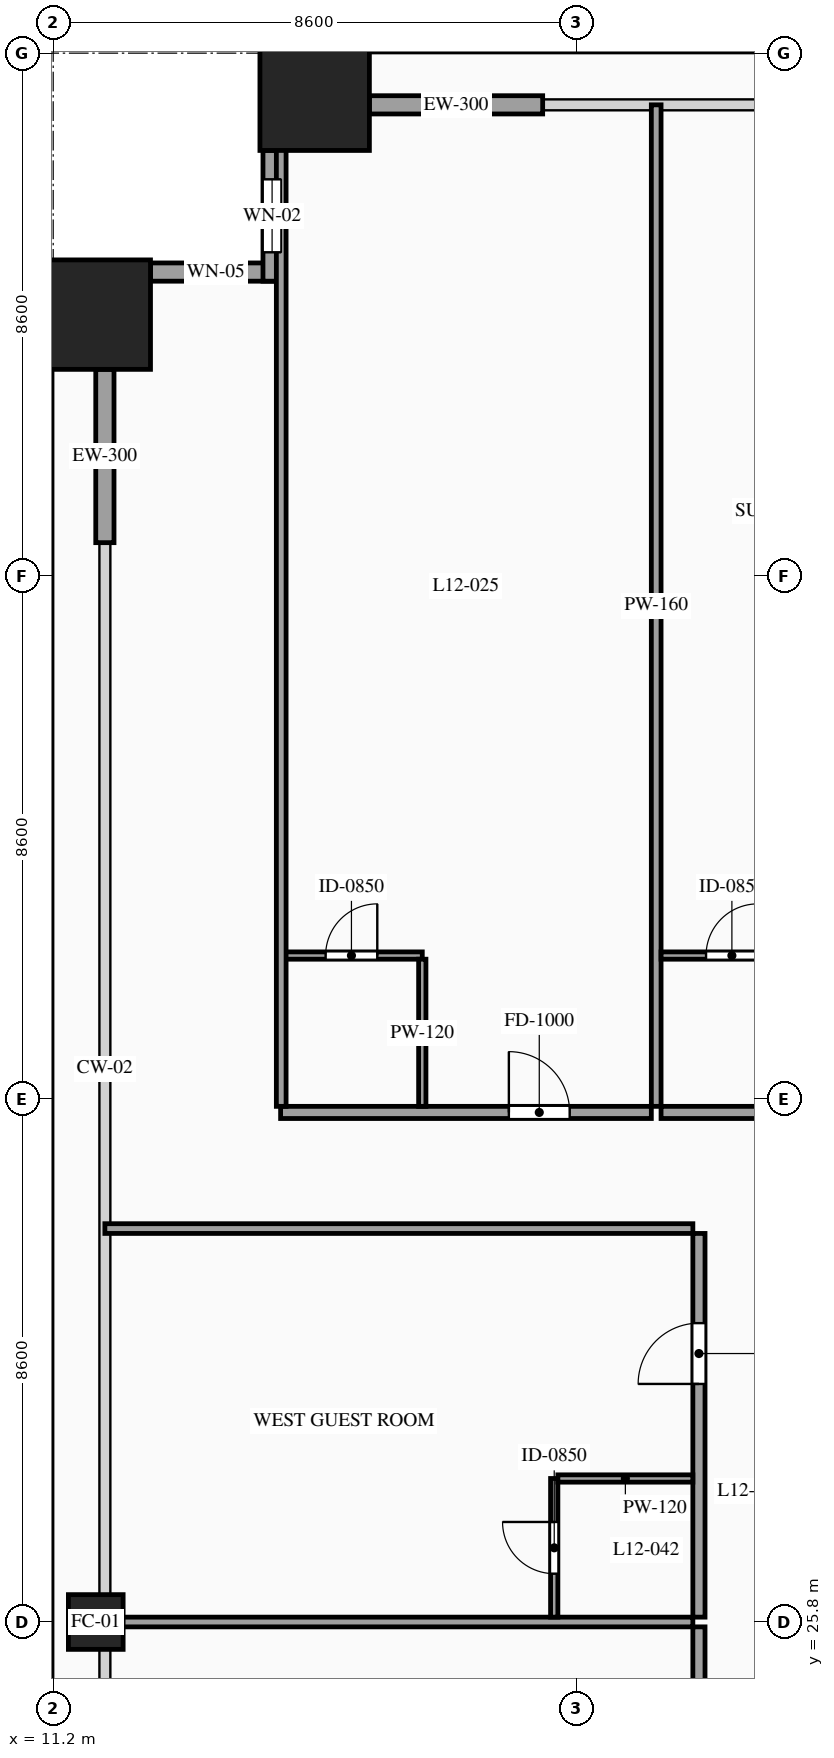
"""IFC4 building model, lengths in metres.
Left out: names, types, materials, properties, quantities, classifications, styles, units other than length and angle.
Written with IfcOpenShell. Run it as: python <this file> out.ifc"""

import sys

from ifc_helpers import new_model, si_unit, direction, frame, frame_2d, origin, origin_2d, place, context, subcontext, project, spatial, rectangle, hollow_rectangle, extrude, source, transform, mapped, element, fill, save


model = new_model("IFC4")
c1 = context("Model", 3, precision=1e-05, world=origin(), true_north=direction((0.0, 1.0)))
c2 = subcontext(c1, "Body", "Model", "MODEL_VIEW")
j1 = project(units=[si_unit("LENGTHUNIT", "METRE"), si_unit("PLANEANGLEUNIT", "RADIAN")], contexts=[c1])
p1 = place(None, origin())
s1 = spatial("IfcSite", under=j1, at=p1, CompositionType="ELEMENT")
p2 = place(p1, origin())
s2 = spatial("IfcBuilding", under=s1, at=p2, CompositionType="ELEMENT")
p3 = place(p2, frame((0.0, 0.0, 49.6)))
s3 = spatial("IfcBuildingStorey", under=s2, at=p3, CompositionType="ELEMENT", Elevation=49.6)
m1 = source(origin(), c2, "Body", "SweptSolid", [
    extrude(hollow_rectangle(XDim=1.8, YDim=1.8, WallThickness=0.08, at=origin_2d()), origin(), (0.0, 0.0, 1.0), 3.6),
])
p4 = place(p3, frame((15.5, 50.9, 0.0), z_axis=(0.0, 0.0, 1.0), x_axis=(1.0, 0.0, 0.0)))
e1 = element("IfcColumn", 1, at=p4, inside=s3, PredefinedType="COLUMN", context=c2, shape_type="MappedRepresentation", body=[
    mapped(m1, transform((0.0, 0.0, 0.0), scale=1.0)),
])
m2 = source(origin(), c2, "Body", "SweptSolid", [
    extrude(hollow_rectangle(XDim=0.9, YDim=0.9, WallThickness=0.042, at=origin_2d()), origin(), (0.0, 0.0, 1.0), 3.6),
])
p5 = place(p3, frame((11.9, 25.8, 0.0), z_axis=(0.0, 0.0, 1.0), x_axis=(1.0, 0.0, 0.0)))
e2 = element("IfcColumn", 2, at=p5, inside=s3, PredefinedType="COLUMN", context=c2, shape_type="MappedRepresentation", body=[
    mapped(m2, transform((0.0, 0.0, 0.0), scale=1.0)),
])
p6 = place(p3, frame((11.9, 47.3, 0.0), z_axis=(0.0, 0.0, 1.0), x_axis=(1.0, 0.0, 0.0)))
e3 = element("IfcColumn", 3, at=p6, inside=s3, PredefinedType="COLUMN", context=c2, shape_type="MappedRepresentation", body=[
    mapped(m1, transform((0.0, 0.0, 0.0), scale=1.0)),
])
p7 = place(p3, frame((14.95, 48.0, 0.0), z_axis=(0.0, 0.0, 1.0), x_axis=(-1.0, 0.0, 0.0)))
e4 = element("IfcWall", 4, at=p7, inside=s3, PredefinedType="SOLIDWALL", context=c2, shape_type="SweptSolid", body=[
    extrude(rectangle(XDim=2.15, YDim=0.3, at=frame_2d((1.075, 0.0))), origin(), (0.0, 0.0, 1.0), 3.38),
])
p8 = place(p7, frame((0.625, 0.0, 0.85)))
e5 = element("IfcOpeningElement", 5, at=p8, cuts=e4, PredefinedType="OPENING", context=c2, shape_type="SweptSolid", body=[
    extrude(rectangle(XDim=0.9, YDim=1.5, at=frame_2d((0.45, 0.75))), frame((0.0, 0.165, 0.0), z_axis=(0.0, -1.0, 0.0), x_axis=(1.0, 0.0, 0.0)), (0.0, 0.0, 1.0), 0.33),
])
p9 = place(p3, frame((14.8, 50.0, 0.0), z_axis=(0.0, 0.0, 1.0), x_axis=(0.0, -1.0, 0.0)))
e6 = element("IfcWall", 6, at=p9, inside=s3, PredefinedType="SOLIDWALL", context=c2, shape_type="SweptSolid", body=[
    extrude(rectangle(XDim=2.15, YDim=0.3, at=frame_2d((1.075, 0.0))), origin(), (0.0, 0.0, 1.0), 3.38),
])
p10 = place(p9, frame((0.475, 0.0, 0.85)))
e7 = element("IfcOpeningElement", 7, at=p10, cuts=e6, PredefinedType="OPENING", context=c2, shape_type="SweptSolid", body=[
    extrude(rectangle(XDim=1.2, YDim=2.1, at=frame_2d((0.6, 1.05))), frame((0.0, 0.165, 0.0), z_axis=(0.0, -1.0, 0.0), x_axis=(1.0, 0.0, 0.0)), (0.0, 0.0, 1.0), 0.33),
])
m3 = source(origin(), c2, "Body", "SweptSolid", [
    extrude(rectangle(XDim=2.85, YDim=0.3, at=frame_2d((1.425, 0.0))), origin(), (0.0, 0.0, 1.0), 2.775),
])
p11 = place(p3, frame((16.4, 50.75, 0.0), z_axis=(0.0, 0.0, 1.0), x_axis=(1.0, 0.0, 0.0)))
e8 = element("IfcWall", 8, at=p11, inside=s3, PredefinedType="SOLIDWALL", context=c2, shape_type="MappedRepresentation", body=[
    mapped(m3, transform((0.0, 0.0, 0.0), scale=1.0)),
])
m4 = source(origin(), c2, "Body", "SweptSolid", [
    extrude(rectangle(XDim=2.85, YDim=0.3, at=frame_2d((1.425, 0.0))), origin(), (0.0, 0.0, 1.0), 2.775),
])
p12 = place(p3, frame((12.05, 43.55, 0.0), z_axis=(0.0, 0.0, 1.0), x_axis=(0.0, 1.0, 0.0)))
e9 = element("IfcWall", 9, at=p12, inside=s3, PredefinedType="SOLIDWALL", context=c2, shape_type="MappedRepresentation", body=[
    mapped(m4, transform((0.0, 0.0, 0.0), scale=1.0)),
])
p13 = place(p3, frame((14.94, 34.18, 0.0), z_axis=(0.0, 0.0, 1.0), x_axis=(1.0, 0.0, 0.0)))
e10 = element("IfcWall", 10, at=p13, inside=s3, PredefinedType="PARTITIONING", context=c2, shape_type="SweptSolid", body=[
    extrude(rectangle(XDim=6.097, YDim=0.2, at=frame_2d((3.049, 0.0))), origin(), (0.0, 0.0, 1.0), 3.38),
])
p14 = place(p13, frame((3.754, 0.0, 0.0)))
e11 = element("IfcOpeningElement", 11, at=p14, cuts=e10, PredefinedType="OPENING", context=c2, shape_type="SweptSolid", body=[
    extrude(rectangle(XDim=1.0, YDim=2.2, at=frame_2d((0.5, 1.1))), frame((0.0, 0.115, 0.0), z_axis=(0.0, -1.0, 0.0), x_axis=(1.0, 0.0, 0.0)), (0.0, 0.0, 1.0), 0.23),
])
m5 = source(origin(), c2, "Body", "SweptSolid", [
    extrude(rectangle(XDim=16.47, YDim=0.16, at=frame_2d((8.235, 0.0))), origin(), (0.0, 0.0, 1.0), 3.38),
])
p15 = place(p3, frame((21.117, 34.28, 0.0), z_axis=(0.0, 0.0, 1.0), x_axis=(0.0, 1.0, 0.0)))
e12 = element("IfcWall", 12, at=p15, inside=s3, PredefinedType="PARTITIONING", context=c2, shape_type="MappedRepresentation", body=[
    mapped(m5, transform((0.0, 0.0, 0.0), scale=1.0)),
])
p16 = place(p3, frame((14.94, 36.76, 0.0), z_axis=(0.0, 0.0, 1.0), x_axis=(1.0, 0.0, 0.0)))
e13 = element("IfcWall", 13, at=p16, inside=s3, PredefinedType="PARTITIONING", context=c2, shape_type="SweptSolid", body=[
    extrude(rectangle(XDim=2.33, YDim=0.12, at=frame_2d((1.165, 0.0))), origin(), (0.0, 0.0, 1.0), 3.38),
])
p17 = place(p16, frame((0.74, 0.0, 0.0)))
e14 = element("IfcOpeningElement", 14, at=p17, cuts=e13, PredefinedType="OPENING", context=c2, shape_type="SweptSolid", body=[
    extrude(rectangle(XDim=0.85, YDim=2.1, at=frame_2d((0.425, 1.05))), frame((0.0, 0.075, 0.0), z_axis=(0.0, -1.0, 0.0), x_axis=(1.0, 0.0, 0.0)), (0.0, 0.0, 1.0), 0.15),
])
m6 = source(origin(), c2, "Body", "SweptSolid", [
    extrude(rectangle(XDim=2.42, YDim=0.12, at=frame_2d((1.21, 0.0))), origin(), (0.0, 0.0, 1.0), 3.38),
])
p18 = place(p3, frame((17.27, 34.28, 0.0), z_axis=(0.0, 0.0, 1.0), x_axis=(0.0, 1.0, 0.0)))
e15 = element("IfcWall", 15, at=p18, inside=s3, PredefinedType="PARTITIONING", context=c2, shape_type="MappedRepresentation", body=[
    mapped(m6, transform((0.0, 0.0, 0.0), scale=1.0)),
])
p19 = place(p3, frame((21.197, 34.18, 0.0), z_axis=(0.0, 0.0, 1.0), x_axis=(1.0, 0.0, 0.0)))
e16 = element("IfcWall", 16, at=p19, inside=s3, PredefinedType="PARTITIONING", context=c2, shape_type="SweptSolid", body=[
    extrude(rectangle(XDim=7.063, YDim=0.2, at=frame_2d((3.531, 0.0))), origin(), (0.0, 0.0, 1.0), 3.38),
])
p20 = place(p19, frame((4.237, 0.0, 0.0)))
e17 = element("IfcOpeningElement", 17, at=p20, cuts=e16, PredefinedType="OPENING", context=c2, shape_type="SweptSolid", body=[
    extrude(rectangle(XDim=1.0, YDim=2.2, at=frame_2d((0.5, 1.1))), frame((0.0, 0.115, 0.0), z_axis=(0.0, -1.0, 0.0), x_axis=(1.0, 0.0, 0.0)), (0.0, 0.0, 1.0), 0.23),
])
p21 = place(p3, frame((21.197, 36.76, 0.0), z_axis=(0.0, 0.0, 1.0), x_axis=(1.0, 0.0, 0.0)))
e18 = element("IfcWall", 18, at=p21, inside=s3, PredefinedType="PARTITIONING", context=c2, shape_type="SweptSolid", body=[
    extrude(rectangle(XDim=2.33, YDim=0.12, at=frame_2d((1.165, 0.0))), origin(), (0.0, 0.0, 1.0), 3.38),
])
p22 = place(p21, frame((0.74, 0.0, 0.0)))
e19 = element("IfcOpeningElement", 19, at=p22, cuts=e18, PredefinedType="OPENING", context=c2, shape_type="SweptSolid", body=[
    extrude(rectangle(XDim=0.85, YDim=2.1, at=frame_2d((0.425, 1.05))), frame((0.0, 0.075, 0.0), z_axis=(0.0, -1.0, 0.0), x_axis=(1.0, 0.0, 0.0)), (0.0, 0.0, 1.0), 0.15),
])
m7 = source(origin(), c2, "Body", "SweptSolid", [
    extrude(rectangle(XDim=16.32, YDim=0.16, at=frame_2d((8.16, 0.0))), origin(), (0.0, 0.0, 1.0), 3.38),
])
p23 = place(p3, frame((14.95, 34.28, 0.0), z_axis=(0.0, 0.0, 1.0), x_axis=(0.0, 1.0, 0.0)))
e20 = element("IfcWall", 20, at=p23, inside=s3, PredefinedType="PARTITIONING", context=c2, shape_type="MappedRepresentation", body=[
    mapped(m7, transform((0.0, 0.0, 0.0), scale=1.0)),
])
p24 = place(p3, frame((21.82, 19.41, 0.0), z_axis=(0.0, 0.0, 1.0), x_axis=(0.0, 1.0, 0.0)))
e21 = element("IfcWall", 21, at=p24, inside=s3, PredefinedType="PARTITIONING", context=c2, shape_type="SweptSolid", body=[
    extrude(rectangle(XDim=6.31, YDim=0.2, at=frame_2d((3.155, 0.0))), origin(), (0.0, 0.0, 1.0), 3.38),
])
p25 = place(p24, frame((3.835, 0.0, 0.0)))
e22 = element("IfcOpeningElement", 22, at=p25, cuts=e21, PredefinedType="OPENING", context=c2, shape_type="SweptSolid", body=[
    extrude(rectangle(XDim=1.0, YDim=2.2, at=frame_2d((0.5, 1.1))), frame((0.0, 0.115, 0.0), z_axis=(0.0, -1.0, 0.0), x_axis=(1.0, 0.0, 0.0)), (0.0, 0.0, 1.0), 0.23),
])
m8 = source(origin(), c2, "Body", "SweptSolid", [
    extrude(rectangle(XDim=9.67, YDim=0.16, at=frame_2d((4.835, 0.0))), origin(), (0.0, 0.0, 1.0), 2.575),
])
p26 = place(p3, frame((12.05, 25.8, 0.0), z_axis=(0.0, 0.0, 1.0), x_axis=(1.0, 0.0, 0.0)))
e23 = element("IfcWall", 23, at=p26, inside=s3, PredefinedType="PARTITIONING", context=c2, shape_type="MappedRepresentation", body=[
    mapped(m8, transform((0.0, 0.0, 0.0), scale=1.0)),
])
p27 = place(p3, frame((21.82, 25.88, 0.0), z_axis=(0.0, 0.0, 1.0), x_axis=(0.0, 1.0, 0.0)))
e24 = element("IfcWall", 24, at=p27, inside=s3, PredefinedType="PARTITIONING", context=c2, shape_type="SweptSolid", body=[
    extrude(rectangle(XDim=6.31, YDim=0.2, at=frame_2d((3.155, 0.0))), origin(), (0.0, 0.0, 1.0), 3.38),
])
p28 = place(p27, frame((3.835, 0.0, 0.0)))
e25 = element("IfcOpeningElement", 25, at=p28, cuts=e24, PredefinedType="OPENING", context=c2, shape_type="SweptSolid", body=[
    extrude(rectangle(XDim=1.0, YDim=2.2, at=frame_2d((0.5, 1.1))), frame((0.0, 0.115, 0.0), z_axis=(0.0, -1.0, 0.0), x_axis=(1.0, 0.0, 0.0)), (0.0, 0.0, 1.0), 0.23),
])
m9 = source(origin(), c2, "Body", "SweptSolid", [
    extrude(rectangle(XDim=9.67, YDim=0.16, at=frame_2d((4.835, 0.0))), origin(), (0.0, 0.0, 1.0), 2.875),
])
p29 = place(p3, frame((12.05, 32.27, 0.0), z_axis=(0.0, 0.0, 1.0), x_axis=(1.0, 0.0, 0.0)))
e26 = element("IfcWall", 26, at=p29, inside=s3, PredefinedType="PARTITIONING", context=c2, shape_type="MappedRepresentation", body=[
    mapped(m9, transform((0.0, 0.0, 0.0), scale=1.0)),
])
p30 = place(p3, frame((19.44, 25.88, 0.0), z_axis=(0.0, 0.0, 1.0), x_axis=(0.0, 1.0, 0.0)))
e27 = element("IfcWall", 27, at=p30, inside=s3, PredefinedType="PARTITIONING", context=c2, shape_type="SweptSolid", body=[
    extrude(rectangle(XDim=2.28, YDim=0.12, at=frame_2d((1.14, 0.0))), origin(), (0.0, 0.0, 1.0), 3.38),
])
p31 = place(p30, frame((0.715, 0.0, 0.0)))
e28 = element("IfcOpeningElement", 28, at=p31, cuts=e27, PredefinedType="OPENING", context=c2, shape_type="SweptSolid", body=[
    extrude(rectangle(XDim=0.85, YDim=2.1, at=frame_2d((0.425, 1.05))), frame((0.0, 0.075, 0.0), z_axis=(0.0, -1.0, 0.0), x_axis=(1.0, 0.0, 0.0)), (0.0, 0.0, 1.0), 0.15),
])
m10 = source(origin(), c2, "Body", "SweptSolid", [
    extrude(rectangle(XDim=2.22, YDim=0.12, at=frame_2d((1.11, 0.0))), origin(), (0.0, 0.0, 1.0), 3.38),
])
p32 = place(p3, frame((19.5, 28.16, 0.0), z_axis=(0.0, 0.0, 1.0), x_axis=(1.0, 0.0, 0.0)))
e29 = element("IfcWall", 29, at=p32, inside=s3, PredefinedType="PARTITIONING", context=c2, shape_type="MappedRepresentation", body=[
    mapped(m10, transform((0.0, 0.0, 0.0), scale=1.0)),
])
m11 = source(origin(), c2, "Body", "SweptSolid", [
    extrude(rectangle(XDim=0.9, YDim=1.5, at=frame_2d((0.45, 0.75))), frame((0.0, 0.03, 0.0), z_axis=(0.0, -1.0, 0.0), x_axis=(1.0, 0.0, 0.0)), (0.0, 0.0, 1.0), 0.06),
])
p33 = place(p8, origin())
e30 = element("IfcWindow", 30, at=p33, inside=s3, PartitioningType="SINGLE_PANEL", PredefinedType="WINDOW", context=c2, shape_type="MappedRepresentation", body=[
    mapped(m11, transform((0.0, 0.0, 0.0), scale=1.0)),
])
fill(e5, e30)
m12 = source(origin(), c2, "Body", "SweptSolid", [
    extrude(rectangle(XDim=1.2, YDim=2.1, at=frame_2d((0.6, 1.05))), frame((0.0, 0.03, 0.0), z_axis=(0.0, -1.0, 0.0), x_axis=(1.0, 0.0, 0.0)), (0.0, 0.0, 1.0), 0.06),
])
p34 = place(p10, origin())
e31 = element("IfcWindow", 31, at=p34, inside=s3, PartitioningType="SINGLE_PANEL", PredefinedType="WINDOW", context=c2, shape_type="MappedRepresentation", body=[
    mapped(m12, transform((0.0, 0.0, 0.0), scale=1.0)),
])
fill(e7, e31)
m13 = source(origin(), c2, "Body", "SweptSolid", [
    extrude(rectangle(XDim=1.0, YDim=2.2, at=frame_2d((0.5, 1.1))), frame((0.0, 0.025, 0.0), z_axis=(0.0, -1.0, 0.0), x_axis=(1.0, 0.0, 0.0)), (0.0, 0.0, 1.0), 0.05),
])
p35 = place(p14, origin())
e32 = element("IfcDoor", 32, at=p35, inside=s3, OperationType="SINGLE_SWING_LEFT", PredefinedType="DOOR", context=c2, shape_type="MappedRepresentation", body=[
    mapped(m13, transform((0.0, 0.0, 0.0), scale=1.0)),
])
fill(e11, e32)
m14 = source(origin(), c2, "Body", "SweptSolid", [
    extrude(rectangle(XDim=0.85, YDim=2.1, at=frame_2d((0.425, 1.05))), frame((0.0, 0.025, 0.0), z_axis=(0.0, -1.0, 0.0), x_axis=(1.0, 0.0, 0.0)), (0.0, 0.0, 1.0), 0.05),
])
p36 = place(p17, origin())
e33 = element("IfcDoor", 33, at=p36, inside=s3, OperationType="SINGLE_SWING_RIGHT", PredefinedType="DOOR", context=c2, shape_type="MappedRepresentation", body=[
    mapped(m14, transform((0.0, 0.0, 0.0), scale=1.0)),
])
fill(e14, e33)
p37 = place(p22, origin())
e34 = element("IfcDoor", 34, at=p37, inside=s3, OperationType="SINGLE_SWING_RIGHT", PredefinedType="DOOR", context=c2, shape_type="MappedRepresentation", body=[
    mapped(m14, transform((0.0, 0.0, 0.0), scale=1.0)),
])
fill(e19, e34)
p38 = place(p28, origin())
e35 = element("IfcDoor", 35, at=p38, inside=s3, OperationType="SINGLE_SWING_LEFT", PredefinedType="DOOR", context=c2, shape_type="MappedRepresentation", body=[
    mapped(m13, transform((0.0, 0.0, 0.0), scale=1.0)),
])
fill(e25, e35)
p39 = place(p31, origin())
e36 = element("IfcDoor", 36, at=p39, inside=s3, OperationType="SINGLE_SWING_RIGHT", PredefinedType="DOOR", context=c2, shape_type="MappedRepresentation", body=[
    mapped(m14, transform((0.0, 0.0, 0.0), scale=1.0)),
])
fill(e28, e36)
save(model, sys.argv[1])
